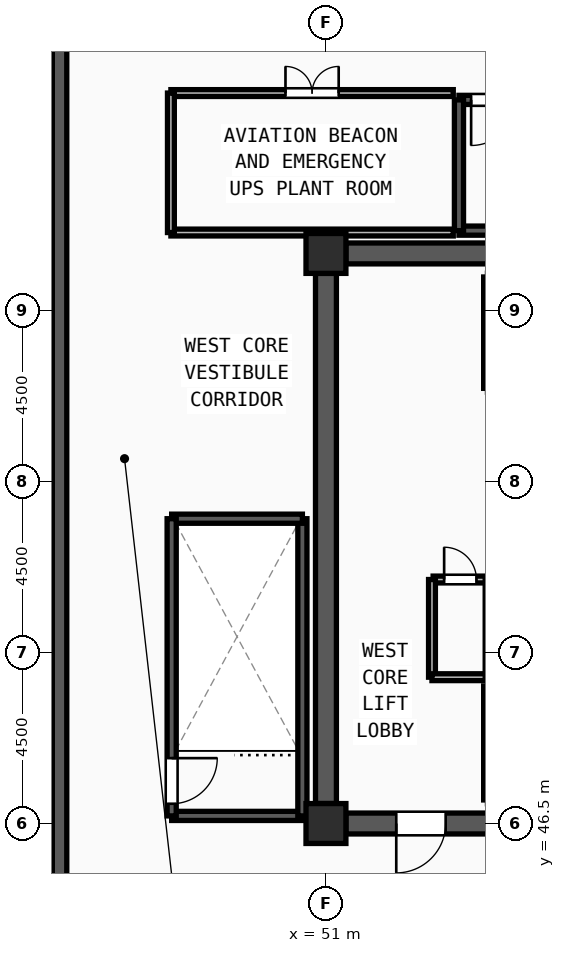
"""IFC4 building model, lengths in metres.
Left out: names, types, materials, properties, quantities, classifications, styles, units other than length and angle.
Written with IfcOpenShell. Run it as: python <this file> out.ifc"""

import sys

from ifc_helpers import new_model, si_unit, direction, frame, frame_2d, origin, origin_2d, place, context, subcontext, project, spatial, rectangle, extrude, source, transform, mapped, element, fill, save


model = new_model("IFC4")
c1 = context("Model", 3, precision=1e-05, world=origin(), true_north=direction((0.0, 1.0)))
c2 = subcontext(c1, "Body", "Model", "MODEL_VIEW")
j1 = project(units=[si_unit("LENGTHUNIT", "METRE"), si_unit("PLANEANGLEUNIT", "RADIAN")], contexts=[c1])
p1 = place(None, origin())
s1 = spatial("IfcSite", under=j1, at=p1, CompositionType="ELEMENT")
p2 = place(p1, origin())
s2 = spatial("IfcBuilding", under=s1, at=p2, CompositionType="ELEMENT")
p3 = place(p2, frame((0.0, 0.0, 366.0)))
s3 = spatial("IfcBuildingStorey", under=s2, at=p3, CompositionType="ELEMENT", Elevation=366.0)
m1 = source(origin(), c2, "Body", "SweptSolid", [
    extrude(rectangle(XDim=1.05, YDim=1.05, at=origin_2d()), origin(), (0.0, 0.0, 1.0), 5.4),
])
for number, where, z_axis, x_axis in (
    (1, (51.0, 46.5, 0.0), (0.0, 0.0, 1.0), (1.0, 0.0, 0.0)),
    (2, (51.0, 61.5, 0.0), (0.0, 0.0, 1.0), (1.0, 0.0, 0.0)),
):
    element("IfcColumn", number, at=place(p3, frame(where, z_axis=z_axis, x_axis=x_axis)), inside=s3, PredefinedType="COLUMN", context=c2, shape_type="MappedRepresentation", body=[
        mapped(m1, transform((0.0, 0.0, 0.0), x_axis=(1.0, 0.0, 0.0), y_axis=(0.0, 1.0, 0.0), z_axis=(0.0, 0.0, 1.0), scale=1.0)),
    ])
p4 = place(p3, frame((43.99, 41.2, 0.0), z_axis=(0.0, 0.0, 1.0), x_axis=(0.0, 1.0, 0.0)))
e3 = element("IfcWall", 3, at=p4, inside=s3, PredefinedType="SOLIDWALL", context=c2, shape_type="SweptSolid", body=[
    extrude(rectangle(XDim=27.3, YDim=0.38, at=frame_2d((13.65, 0.0))), origin(), (0.0, 0.0, 1.0), 4.95),
])
p5 = place(p3, frame((51.525, 61.5, 0.0), z_axis=(0.0, 0.0, 1.0), x_axis=(1.0, 0.0, 0.0)))
e4 = element("IfcWall", 4, at=p5, inside=s3, PredefinedType="SHEAR", context=c2, shape_type="SweptSolid", body=[
    extrude(rectangle(XDim=7.95, YDim=0.55, at=frame_2d((3.975, 0.0))), origin(), (0.0, 0.0, 1.0), 4.95),
])
p6 = place(p3, frame((59.475, 46.5, 0.0), z_axis=(0.0, 0.0, 1.0), x_axis=(-1.0, 0.0, 0.0)))
e5 = element("IfcWall", 5, at=p6, inside=s3, PredefinedType="SHEAR", context=c2, shape_type="SweptSolid", body=[
    extrude(rectangle(XDim=7.95, YDim=0.55, at=frame_2d((3.975, 0.0))), origin(), (0.0, 0.0, 1.0), 4.95),
])
m2 = source(origin(), c2, "Body", "SweptSolid", [
    extrude(rectangle(XDim=1.3, YDim=2.2, at=frame_2d((0.65, 1.1))), frame((0.0, 0.285, 0.0), z_axis=(0.0, -1.0, 0.0), x_axis=(1.0, 0.0, 0.0)), (0.0, 0.0, 1.0), 0.57),
])
p7 = place(p6, frame((5.325, 0.0, 0.0)))
e6 = element("IfcOpeningElement", 6, at=p7, cuts=e5, PredefinedType="OPENING", context=c2, shape_type="MappedRepresentation", body=[
    mapped(m2, transform((0.0, 0.0, 0.0), x_axis=(1.0, 0.0, 0.0), y_axis=(0.0, 1.0, 0.0), z_axis=(0.0, 0.0, 1.0), scale=1.0)),
])
m3 = source(origin(), c2, "Body", "SweptSolid", [
    extrude(rectangle(XDim=1.0, YDim=2.2, at=frame_2d((0.5, 1.1))), frame((0.0, 0.285, 0.0), z_axis=(0.0, -1.0, 0.0), x_axis=(1.0, 0.0, 0.0)), (0.0, 0.0, 1.0), 0.57),
])
p8 = place(p6, frame((0.825, 0.0, 0.0)))
e7 = element("IfcOpeningElement", 7, at=p8, cuts=e5, PredefinedType="OPENING", context=c2, shape_type="MappedRepresentation", body=[
    mapped(m3, transform((0.0, 0.0, 0.0), x_axis=(1.0, 0.0, 0.0), y_axis=(0.0, 1.0, 0.0), z_axis=(0.0, 0.0, 1.0), scale=1.0)),
])
p9 = place(p3, frame((51.0, 47.025, 0.0), z_axis=(0.0, 0.0, 1.0), x_axis=(0.0, 1.0, 0.0)))
e8 = element("IfcWall", 8, at=p9, inside=s3, PredefinedType="SHEAR", context=c2, shape_type="SweptSolid", body=[
    extrude(rectangle(XDim=13.95, YDim=0.55, at=frame_2d((6.975, 0.0))), origin(), (0.0, 0.0, 1.0), 4.95),
])
p10 = place(p3, frame((46.94, 46.7, 0.0), z_axis=(0.0, 0.0, 1.0), x_axis=(1.0, 0.0, 0.0)))
e9 = element("IfcWall", 9, at=p10, inside=s3, PredefinedType="SOLIDWALL", context=c2, shape_type="SweptSolid", body=[
    extrude(rectangle(XDim=3.44, YDim=0.24, at=frame_2d((1.72, 0.0))), origin(), (0.0, 0.0, 1.0), 4.95),
])
p11 = place(p3, frame((50.38, 46.7, 0.0), z_axis=(0.0, 0.0, 1.0), x_axis=(0.0, 1.0, 0.0)))
e10 = element("IfcWall", 10, at=p11, inside=s3, PredefinedType="SOLIDWALL", context=c2, shape_type="SweptSolid", body=[
    extrude(rectangle(XDim=7.82, YDim=0.24, at=frame_2d((3.91, 0.0))), origin(), (0.0, 0.0, 1.0), 4.95),
])
p12 = place(p3, frame((50.38, 54.52, 0.0), z_axis=(0.0, 0.0, 1.0), x_axis=(-1.0, 0.0, 0.0)))
e11 = element("IfcWall", 11, at=p12, inside=s3, PredefinedType="SOLIDWALL", context=c2, shape_type="SweptSolid", body=[
    extrude(rectangle(XDim=3.44, YDim=0.24, at=frame_2d((1.72, 0.0))), origin(), (0.0, 0.0, 1.0), 4.95),
])
p13 = place(p3, frame((46.94, 54.52, 0.0), z_axis=(0.0, 0.0, 1.0), x_axis=(0.0, -1.0, 0.0)))
e12 = element("IfcWall", 12, at=p13, inside=s3, PredefinedType="SOLIDWALL", context=c2, shape_type="SweptSolid", body=[
    extrude(rectangle(XDim=7.82, YDim=0.24, at=frame_2d((3.91, 0.0))), origin(), (0.0, 0.0, 1.0), 4.95),
])
m4 = source(origin(), c2, "Body", "SweptSolid", [
    extrude(rectangle(XDim=1.2, YDim=2.2, at=frame_2d((0.6, 1.1))), frame((0.0, 0.13, 0.0), z_axis=(0.0, -1.0, 0.0), x_axis=(1.0, 0.0, 0.0)), (0.0, 0.0, 1.0), 0.26),
])
p14 = place(p13, frame((6.3, 0.0, 0.0)))
e13 = element("IfcOpeningElement", 13, at=p14, cuts=e12, PredefinedType="OPENING", context=c2, shape_type="MappedRepresentation", body=[
    mapped(m4, transform((0.0, 0.0, 0.0), x_axis=(1.0, 0.0, 0.0), y_axis=(0.0, 1.0, 0.0), z_axis=(0.0, 0.0, 1.0), scale=1.0)),
])
p15 = place(p3, frame((54.5, 62.1, 0.0), z_axis=(0.0, 0.0, 1.0), x_axis=(1.0, 0.0, 0.0)))
e14 = element("IfcWall", 14, at=p15, inside=s3, PredefinedType="SOLIDWALL", context=c2, shape_type="SweptSolid", body=[
    extrude(rectangle(XDim=7.82, YDim=0.24, at=frame_2d((3.91, 0.0))), origin(), (0.0, 0.0, 1.0), 4.95),
])
p16 = place(p3, frame((62.32, 65.54, 0.0), z_axis=(0.0, 0.0, 1.0), x_axis=(-1.0, 0.0, 0.0)))
e15 = element("IfcWall", 15, at=p16, inside=s3, PredefinedType="SOLIDWALL", context=c2, shape_type="SweptSolid", body=[
    extrude(rectangle(XDim=7.82, YDim=0.24, at=frame_2d((3.91, 0.0))), origin(), (0.0, 0.0, 1.0), 4.95),
])
p17 = place(p16, frame((6.3, 0.0, 0.0)))
e16 = element("IfcOpeningElement", 16, at=p17, cuts=e15, PredefinedType="OPENING", context=c2, shape_type="MappedRepresentation", body=[
    mapped(m4, transform((0.0, 0.0, 0.0), x_axis=(1.0, 0.0, 0.0), y_axis=(0.0, 1.0, 0.0), z_axis=(0.0, 0.0, 1.0), scale=1.0)),
])
p18 = place(p3, frame((54.5, 65.54, 0.0), z_axis=(0.0, 0.0, 1.0), x_axis=(0.0, -1.0, 0.0)))
e17 = element("IfcWall", 17, at=p18, inside=s3, PredefinedType="SOLIDWALL", context=c2, shape_type="SweptSolid", body=[
    extrude(rectangle(XDim=3.44, YDim=0.24, at=frame_2d((1.72, 0.0))), origin(), (0.0, 0.0, 1.0), 4.95),
])
p19 = place(p3, frame((55.25, 50.12, 0.0), z_axis=(0.0, 0.0, 1.0), x_axis=(0.0, -1.0, 0.0)))
e18 = element("IfcWall", 18, at=p19, inside=s3, PredefinedType="SOLIDWALL", context=c2, shape_type="SweptSolid", body=[
    extrude(rectangle(XDim=3.0, YDim=0.2, at=frame_2d((1.5, 0.0))), origin(), (0.0, 0.0, 1.0), 4.95),
])
p20 = place(p3, frame((55.25, 60.88, 0.0), z_axis=(0.0, 0.0, 1.0), x_axis=(0.0, -1.0, 0.0)))
e19 = element("IfcWall", 19, at=p20, inside=s3, PredefinedType="SOLIDWALL", context=c2, shape_type="SweptSolid", body=[
    extrude(rectangle(XDim=2.93, YDim=0.2, at=frame_2d((1.465, 0.0))), origin(), (0.0, 0.0, 1.0), 4.95),
])
p21 = place(p3, frame((53.82, 52.92, 0.0), z_axis=(0.0, 0.0, 1.0), x_axis=(1.0, 0.0, 0.0)))
e20 = element("IfcWall", 20, at=p21, inside=s3, PredefinedType="PARTITIONING", context=c2, shape_type="SweptSolid", body=[
    extrude(rectangle(XDim=1.43, YDim=0.18, at=frame_2d((0.715, 0.0))), origin(), (0.0, 0.0, 1.0), 4.95),
])
m5 = source(origin(), c2, "Body", "SweptSolid", [
    extrude(rectangle(XDim=0.85, YDim=2.1, at=frame_2d((0.425, 1.05))), frame((0.0, 0.1, 0.0), z_axis=(0.0, -1.0, 0.0), x_axis=(1.0, 0.0, 0.0)), (0.0, 0.0, 1.0), 0.2),
])
p22 = place(p21, frame((0.29, 0.0, 0.0)))
e21 = element("IfcOpeningElement", 21, at=p22, cuts=e20, PredefinedType="OPENING", context=c2, shape_type="MappedRepresentation", body=[
    mapped(m5, transform((0.0, 0.0, 0.0), x_axis=(1.0, 0.0, 0.0), y_axis=(0.0, 1.0, 0.0), z_axis=(0.0, 0.0, 1.0), scale=1.0)),
])
p23 = place(p3, frame((46.92, 65.72, 0.0), z_axis=(0.0, 0.0, 1.0), x_axis=(1.0, 0.0, 0.0)))
e22 = element("IfcWall", 22, at=p23, inside=s3, PredefinedType="PARTITIONING", context=c2, shape_type="SweptSolid", body=[
    extrude(rectangle(XDim=7.43, YDim=0.18, at=frame_2d((3.715, 0.0))), origin(), (0.0, 0.0, 1.0), 4.95),
])
m6 = source(origin(), c2, "Body", "SweptSolid", [
    extrude(rectangle(XDim=1.4, YDim=2.25, at=frame_2d((0.7, 1.125))), frame((0.0, 0.1, 0.0), z_axis=(0.0, -1.0, 0.0), x_axis=(1.0, 0.0, 0.0)), (0.0, 0.0, 1.0), 0.2),
])
p24 = place(p23, frame((3.015, 0.0, 0.0)))
e23 = element("IfcOpeningElement", 23, at=p24, cuts=e22, PredefinedType="OPENING", context=c2, shape_type="MappedRepresentation", body=[
    mapped(m6, transform((0.0, 0.0, 0.0), x_axis=(1.0, 0.0, 0.0), y_axis=(0.0, 1.0, 0.0), z_axis=(0.0, 0.0, 1.0), scale=1.0)),
])
p25 = place(p3, frame((53.79, 50.35, 0.0), z_axis=(0.0, 0.0, 1.0), x_axis=(0.0, 1.0, 0.0)))
e24 = element("IfcWall", 24, at=p25, inside=s3, PredefinedType="PARTITIONING", context=c2, shape_type="SweptSolid", body=[
    extrude(rectangle(XDim=2.57, YDim=0.18, at=frame_2d((1.285, 0.0))), origin(), (0.0, 0.0, 1.0), 4.95),
])
p26 = place(p3, frame((53.79, 50.35, 0.0), z_axis=(0.0, 0.0, 1.0), x_axis=(1.0, 0.0, 0.0)))
e25 = element("IfcWall", 25, at=p26, inside=s3, PredefinedType="PARTITIONING", context=c2, shape_type="SweptSolid", body=[
    extrude(rectangle(XDim=1.49, YDim=0.18, at=frame_2d((0.745, 0.0))), origin(), (0.0, 0.0, 1.0), 4.95),
])
p27 = place(p3, frame((55.28, 50.35, 0.0), z_axis=(0.0, 0.0, 1.0), x_axis=(0.0, 1.0, 0.0)))
e26 = element("IfcWall", 26, at=p27, inside=s3, PredefinedType="PARTITIONING", context=c2, shape_type="SweptSolid", body=[
    extrude(rectangle(XDim=2.57, YDim=0.18, at=frame_2d((1.285, 0.0))), origin(), (0.0, 0.0, 1.0), 4.95),
])
p28 = place(p3, frame((46.92, 62.05, 0.0), z_axis=(0.0, 0.0, 1.0), x_axis=(1.0, 0.0, 0.0)))
e27 = element("IfcWall", 27, at=p28, inside=s3, PredefinedType="PARTITIONING", context=c2, shape_type="SweptSolid", body=[
    extrude(rectangle(XDim=7.43, YDim=0.18, at=frame_2d((3.715, 0.0))), origin(), (0.0, 0.0, 1.0), 4.235),
])
p29 = place(p3, frame((46.92, 62.05, 0.0), z_axis=(0.0, 0.0, 1.0), x_axis=(0.0, 1.0, 0.0)))
e28 = element("IfcWall", 28, at=p29, inside=s3, PredefinedType="PARTITIONING", context=c2, shape_type="SweptSolid", body=[
    extrude(rectangle(XDim=3.67, YDim=0.18, at=frame_2d((1.835, 0.0))), origin(), (0.0, 0.0, 1.0), 4.95),
])
m7 = source(origin(), c2, "Body", "SweptSolid", [
    extrude(rectangle(XDim=1.3, YDim=2.2, at=frame_2d((0.65, 1.1))), frame((0.0, 0.025, 0.0), z_axis=(0.0, -1.0, 0.0), x_axis=(1.0, 0.0, 0.0)), (0.0, 0.0, 1.0), 0.05),
])
p30 = place(p7, origin())
e29 = element("IfcDoor", 29, at=p30, inside=s3, OperationType="SINGLE_SWING_RIGHT", PredefinedType="DOOR", context=c2, shape_type="MappedRepresentation", body=[
    mapped(m7, transform((0.0, 0.0, 0.0), x_axis=(1.0, 0.0, 0.0), y_axis=(0.0, 1.0, 0.0), z_axis=(0.0, 0.0, 1.0), scale=1.0)),
])
fill(e6, e29)
m8 = source(origin(), c2, "Body", "SweptSolid", [
    extrude(rectangle(XDim=1.2, YDim=2.2, at=frame_2d((0.6, 1.1))), frame((0.0, 0.025, 0.0), z_axis=(0.0, -1.0, 0.0), x_axis=(1.0, 0.0, 0.0)), (0.0, 0.0, 1.0), 0.05),
])
p31 = place(p14, origin())
e30 = element("IfcDoor", 30, at=p31, inside=s3, OperationType="SINGLE_SWING_LEFT", PredefinedType="DOOR", context=c2, shape_type="MappedRepresentation", body=[
    mapped(m8, transform((0.0, 0.0, 0.0), x_axis=(1.0, 0.0, 0.0), y_axis=(0.0, 1.0, 0.0), z_axis=(0.0, 0.0, 1.0), scale=1.0)),
])
fill(e13, e30)
p32 = place(p17, origin())
e31 = element("IfcDoor", 31, at=p32, inside=s3, OperationType="SINGLE_SWING_RIGHT", PredefinedType="DOOR", context=c2, shape_type="MappedRepresentation", body=[
    mapped(m8, transform((0.0, 0.0, 0.0), x_axis=(1.0, 0.0, 0.0), y_axis=(0.0, 1.0, 0.0), z_axis=(0.0, 0.0, 1.0), scale=1.0)),
])
fill(e16, e31)
m9 = source(origin(), c2, "Body", "SweptSolid", [
    extrude(rectangle(XDim=0.85, YDim=2.1, at=frame_2d((0.425, 1.05))), frame((0.0, 0.025, 0.0), z_axis=(0.0, -1.0, 0.0), x_axis=(1.0, 0.0, 0.0)), (0.0, 0.0, 1.0), 0.05),
])
p33 = place(p22, origin())
e32 = element("IfcDoor", 32, at=p33, inside=s3, OperationType="SINGLE_SWING_LEFT", PredefinedType="DOOR", context=c2, shape_type="MappedRepresentation", body=[
    mapped(m9, transform((0.0, 0.0, 0.0), x_axis=(1.0, 0.0, 0.0), y_axis=(0.0, 1.0, 0.0), z_axis=(0.0, 0.0, 1.0), scale=1.0)),
])
fill(e21, e32)
m10 = source(origin(), c2, "Body", "SweptSolid", [
    extrude(rectangle(XDim=1.4, YDim=2.25, at=frame_2d((0.7, 1.125))), frame((0.0, 0.025, 0.0), z_axis=(0.0, -1.0, 0.0), x_axis=(1.0, 0.0, 0.0)), (0.0, 0.0, 1.0), 0.05),
])
p34 = place(p24, origin())
e33 = element("IfcDoor", 33, at=p34, inside=s3, OperationType="DOUBLE_DOOR_SINGLE_SWING", PredefinedType="DOOR", context=c2, shape_type="MappedRepresentation", body=[
    mapped(m10, transform((0.0, 0.0, 0.0), x_axis=(1.0, 0.0, 0.0), y_axis=(0.0, 1.0, 0.0), z_axis=(0.0, 0.0, 1.0), scale=1.0)),
])
fill(e23, e33)
save(model, sys.argv[1])
